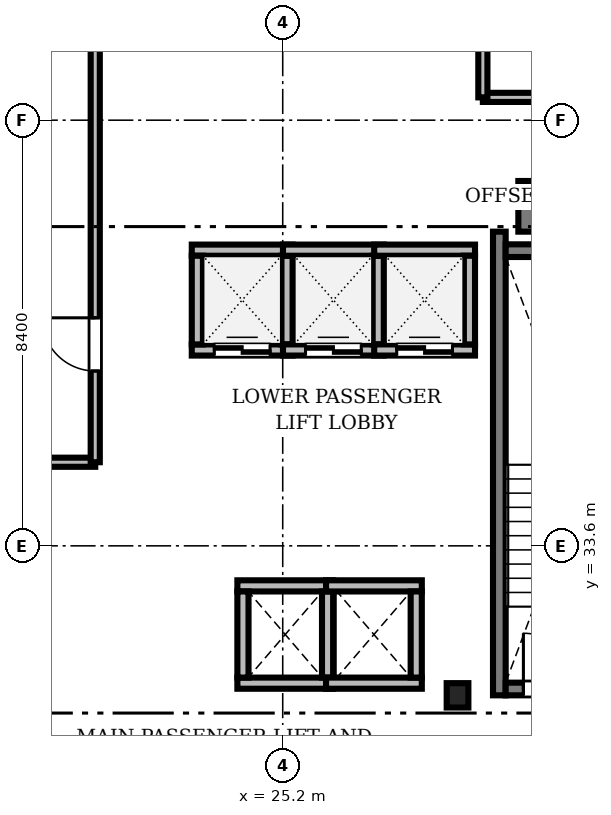
"""IFC4 building model, lengths in metres.
Left out: names, types, materials, properties, quantities, classifications, styles, units other than length and angle.
Written with IfcOpenShell. Run it as: python <this file> out.ifc"""

import sys

from ifc_helpers import new_model, si_unit, direction, frame, frame_2d, origin, origin_2d, place, context, subcontext, project, spatial, rectangle, i_section, extrude, source, transform, mapped, element, fill, save


model = new_model("IFC4")
c1 = context("Model", 3, precision=1e-05, world=origin(), true_north=direction((0.0, 1.0)))
c2 = subcontext(c1, "Body", "Model", "MODEL_VIEW")
j1 = project(units=[si_unit("LENGTHUNIT", "METRE"), si_unit("PLANEANGLEUNIT", "RADIAN")], contexts=[c1])
p1 = place(None, origin())
s1 = spatial("IfcSite", under=j1, at=p1, CompositionType="ELEMENT")
p2 = place(p1, origin())
s2 = spatial("IfcBuilding", under=s1, at=p2, CompositionType="ELEMENT")
p3 = place(p2, frame((0.0, 0.0, 56.8)))
s3 = spatial("IfcBuildingStorey", under=s2, at=p3, CompositionType="ELEMENT", Elevation=56.8)
m1 = source(origin(), c2, "Body", "SweptSolid", [
    extrude(rectangle(XDim=17.52, YDim=1.0, at=frame_2d((8.76, 0.0))), origin(), (0.0, 0.0, 1.0), 3.41),
])
p4 = place(p3, frame((29.85, 40.3, 0.0), z_axis=(0.0, 0.0, 1.0), x_axis=(1.0, 0.0, 0.0)))
e1 = element("IfcWall", 1, at=p4, inside=s3, PredefinedType="SHEAR", context=c2, shape_type="MappedRepresentation", body=[
    mapped(m1, transform((0.0, 0.0, 0.0), scale=1.0)),
])
m2 = source(origin(), c2, "Body", "SweptSolid", [
    extrude(i_section(OverallWidth=0.428, OverallDepth=0.481, WebThickness=0.04, FlangeThickness=0.063, FilletRadius=0.015, at=origin_2d()), origin(), (0.0, 0.0, 1.0), 3.41),
])
p5 = place(p3, frame((28.65, 30.65, 0.0), z_axis=(0.0, 0.0, 1.0), x_axis=(1.0, 0.0, 0.0)))
e2 = element("IfcColumn", 2, at=p5, inside=s3, PredefinedType="COLUMN", context=c2, shape_type="MappedRepresentation", body=[
    mapped(m2, transform((0.0, 0.0, 0.0), scale=1.0)),
])
m3 = source(origin(), c2, "Body", "SweptSolid", [
    extrude(rectangle(XDim=9.15, YDim=0.25, at=frame_2d((4.575, 0.0))), origin(), (0.0, 0.0, 1.0), 3.45),
])
p6 = place(p3, frame((29.475, 30.65, 0.0), z_axis=(0.0, 0.0, 1.0), x_axis=(0.0, 1.0, 0.0)))
e3 = element("IfcWall", 3, at=p6, inside=s3, PredefinedType="SOLIDWALL", context=c2, shape_type="MappedRepresentation", body=[
    mapped(m3, transform((0.0, 0.0, 0.0), scale=1.0)),
])
m4 = source(origin(), c2, "Body", "SweptSolid", [
    extrude(rectangle(XDim=3.15, YDim=0.25, at=frame_2d((1.575, 0.0))), origin(), (0.0, 0.0, 1.0), 3.45),
])
p7 = place(p3, frame((29.6, 39.425, 0.0), z_axis=(0.0, 0.0, 1.0), x_axis=(1.0, 0.0, 0.0)))
e4 = element("IfcWall", 4, at=p7, inside=s3, PredefinedType="SOLIDWALL", context=c2, shape_type="MappedRepresentation", body=[
    mapped(m4, transform((0.0, 0.0, 0.0), scale=1.0)),
])
p8 = place(p3, frame((29.6, 30.775, 0.0), z_axis=(0.0, 0.0, 1.0), x_axis=(1.0, 0.0, 0.0)))
e5 = element("IfcWall", 5, at=p8, inside=s3, PredefinedType="SOLIDWALL", context=c2, shape_type="MappedRepresentation", body=[
    mapped(m4, transform((0.0, 0.0, 0.0), scale=1.0)),
])
m5 = source(origin(), c2, "Body", "SweptSolid", [
    extrude(rectangle(XDim=1.1, YDim=2.2, at=frame_2d((0.55, 1.1))), frame((0.0, 0.135, 0.0), z_axis=(0.0, -1.0, 0.0), x_axis=(1.0, 0.0, 0.0)), (0.0, 0.0, 1.0), 0.27),
])
p9 = place(p8, frame((0.35, 0.0, 0.0)))
e6 = element("IfcOpeningElement", 6, at=p9, cuts=e5, PredefinedType="OPENING", context=c2, shape_type="MappedRepresentation", body=[
    mapped(m5, transform((0.0, 0.0, 0.0), scale=1.0)),
])
m6 = source(origin(), c2, "Body", "SweptSolid", [
    extrude(rectangle(XDim=1.99, YDim=0.22, at=frame_2d((0.995, 0.0))), origin(), (0.0, 0.0, 1.0), 3.41),
])
p10 = place(p3, frame((23.405, 37.465, 0.0), z_axis=(0.0, 0.0, 1.0), x_axis=(1.0, 0.0, 0.0)))
e7 = element("IfcWall", 7, at=p10, inside=s3, PredefinedType="SOLIDWALL", context=c2, shape_type="MappedRepresentation", body=[
    mapped(m6, transform((0.0, 0.0, 0.0), scale=1.0)),
])
m7 = source(origin(), c2, "Body", "SweptSolid", [
    extrude(rectangle(XDim=1.1, YDim=2.2, at=frame_2d((0.55, 1.1))), frame((0.0, 0.12, 0.0), z_axis=(0.0, -1.0, 0.0), x_axis=(1.0, 0.0, 0.0)), (0.0, 0.0, 1.0), 0.24),
])
p11 = place(p10, frame((0.445, 0.0, 0.0)))
e8 = element("IfcOpeningElement", 8, at=p11, cuts=e7, PredefinedType="OPENING", context=c2, shape_type="MappedRepresentation", body=[
    mapped(m7, transform((0.0, 0.0, 0.0), scale=1.0)),
])
p12 = place(p3, frame((23.405, 39.435, 0.0), z_axis=(0.0, 0.0, 1.0), x_axis=(1.0, 0.0, 0.0)))
e9 = element("IfcWall", 9, at=p12, inside=s3, PredefinedType="SOLIDWALL", context=c2, shape_type="MappedRepresentation", body=[
    mapped(m6, transform((0.0, 0.0, 0.0), scale=1.0)),
])
m8 = source(origin(), c2, "Body", "SweptSolid", [
    extrude(rectangle(XDim=1.75, YDim=0.22, at=frame_2d((0.875, 0.0))), origin(), (0.0, 0.0, 1.0), 3.41),
])
for number, where, z_axis, x_axis in (
    (10, (23.515, 37.575, 0.0), (0.0, 0.0, 1.0), (0.0, 1.0, 0.0)),
    (11, (25.285, 37.575, 0.0), (0.0, 0.0, 1.0), (0.0, 1.0, 0.0)),
):
    element("IfcWall", number, at=place(p3, frame(where, z_axis=z_axis, x_axis=x_axis)), inside=s3, PredefinedType="SOLIDWALL", context=c2, shape_type="MappedRepresentation", body=[
        mapped(m8, transform((0.0, 0.0, 0.0), scale=1.0)),
    ])
p13 = place(p3, frame((25.205, 37.465, 0.0), z_axis=(0.0, 0.0, 1.0), x_axis=(1.0, 0.0, 0.0)))
e12 = element("IfcWall", 12, at=p13, inside=s3, PredefinedType="SOLIDWALL", context=c2, shape_type="MappedRepresentation", body=[
    mapped(m6, transform((0.0, 0.0, 0.0), scale=1.0)),
])
p14 = place(p13, frame((0.445, 0.0, 0.0)))
e13 = element("IfcOpeningElement", 13, at=p14, cuts=e12, PredefinedType="OPENING", context=c2, shape_type="MappedRepresentation", body=[
    mapped(m7, transform((0.0, 0.0, 0.0), scale=1.0)),
])
p15 = place(p3, frame((25.205, 39.435, 0.0), z_axis=(0.0, 0.0, 1.0), x_axis=(1.0, 0.0, 0.0)))
e14 = element("IfcWall", 14, at=p15, inside=s3, PredefinedType="SOLIDWALL", context=c2, shape_type="MappedRepresentation", body=[
    mapped(m6, transform((0.0, 0.0, 0.0), scale=1.0)),
])
p16 = place(p3, frame((27.085, 37.575, 0.0), z_axis=(0.0, 0.0, 1.0), x_axis=(0.0, 1.0, 0.0)))
e15 = element("IfcWall", 15, at=p16, inside=s3, PredefinedType="SOLIDWALL", context=c2, shape_type="MappedRepresentation", body=[
    mapped(m8, transform((0.0, 0.0, 0.0), scale=1.0)),
])
m9 = source(origin(), c2, "Body", "SweptSolid", [
    extrude(rectangle(XDim=1.99, YDim=0.22, at=frame_2d((0.995, 0.0))), origin(), (0.0, 0.0, 1.0), 3.41),
])
p17 = place(p3, frame((27.005, 37.465, 0.0), z_axis=(0.0, 0.0, 1.0), x_axis=(1.0, 0.0, 0.0)))
e16 = element("IfcWall", 16, at=p17, inside=s3, PredefinedType="SOLIDWALL", context=c2, shape_type="MappedRepresentation", body=[
    mapped(m9, transform((0.0, 0.0, 0.0), scale=1.0)),
])
p18 = place(p17, frame((0.445, 0.0, 0.0)))
e17 = element("IfcOpeningElement", 17, at=p18, cuts=e16, PredefinedType="OPENING", context=c2, shape_type="MappedRepresentation", body=[
    mapped(m7, transform((0.0, 0.0, 0.0), scale=1.0)),
])
p19 = place(p3, frame((27.005, 39.435, 0.0), z_axis=(0.0, 0.0, 1.0), x_axis=(1.0, 0.0, 0.0)))
e18 = element("IfcWall", 18, at=p19, inside=s3, PredefinedType="SOLIDWALL", context=c2, shape_type="MappedRepresentation", body=[
    mapped(m9, transform((0.0, 0.0, 0.0), scale=1.0)),
])
p20 = place(p3, frame((28.885, 37.575, 0.0), z_axis=(0.0, 0.0, 1.0), x_axis=(0.0, 1.0, 0.0)))
e19 = element("IfcWall", 19, at=p20, inside=s3, PredefinedType="SOLIDWALL", context=c2, shape_type="MappedRepresentation", body=[
    mapped(m8, transform((0.0, 0.0, 0.0), scale=1.0)),
])
m10 = source(origin(), c2, "Body", "SweptSolid", [
    extrude(rectangle(XDim=1.89, YDim=0.22, at=frame_2d((0.945, 0.0))), origin(), (0.0, 0.0, 1.0), 3.41),
])
for number, where, z_axis, x_axis in (
    (20, (24.305, 30.89, 0.0), (0.0, 0.0, 1.0), (1.0, 0.0, 0.0)),
    (21, (24.305, 32.81, 0.0), (0.0, 0.0, 1.0), (1.0, 0.0, 0.0)),
):
    element("IfcWall", number, at=place(p3, frame(where, z_axis=z_axis, x_axis=x_axis)), inside=s3, PredefinedType="SOLIDWALL", context=c2, shape_type="MappedRepresentation", body=[
        mapped(m10, transform((0.0, 0.0, 0.0), scale=1.0)),
    ])
m11 = source(origin(), c2, "Body", "SweptSolid", [
    extrude(rectangle(XDim=1.7, YDim=0.22, at=frame_2d((0.85, 0.0))), origin(), (0.0, 0.0, 1.0), 3.41),
])
for number, where, z_axis, x_axis in (
    (22, (24.415, 31.0, 0.0), (0.0, 0.0, 1.0), (0.0, 1.0, 0.0)),
    (23, (26.085, 31.0, 0.0), (0.0, 0.0, 1.0), (0.0, 1.0, 0.0)),
):
    element("IfcWall", number, at=place(p3, frame(where, z_axis=z_axis, x_axis=x_axis)), inside=s3, PredefinedType="SOLIDWALL", context=c2, shape_type="MappedRepresentation", body=[
        mapped(m11, transform((0.0, 0.0, 0.0), scale=1.0)),
    ])
for number, where, z_axis, x_axis in (
    (24, (26.055, 30.89, 0.0), (0.0, 0.0, 1.0), (1.0, 0.0, 0.0)),
    (25, (26.055, 32.81, 0.0), (0.0, 0.0, 1.0), (1.0, 0.0, 0.0)),
):
    element("IfcWall", number, at=place(p3, frame(where, z_axis=z_axis, x_axis=x_axis)), inside=s3, PredefinedType="SOLIDWALL", context=c2, shape_type="MappedRepresentation", body=[
        mapped(m10, transform((0.0, 0.0, 0.0), scale=1.0)),
    ])
p21 = place(p3, frame((27.835, 31.0, 0.0), z_axis=(0.0, 0.0, 1.0), x_axis=(0.0, 1.0, 0.0)))
e26 = element("IfcWall", 26, at=p21, inside=s3, PredefinedType="SOLIDWALL", context=c2, shape_type="MappedRepresentation", body=[
    mapped(m11, transform((0.0, 0.0, 0.0), scale=1.0)),
])
m12 = source(origin(), c2, "Body", "SweptSolid", [
    extrude(rectangle(XDim=19.428, YDim=0.18, at=frame_2d((9.714, 0.0))), origin(), (0.0, 0.0, 1.0), 2.652),
])
p22 = place(p3, frame((29.15, 42.45, 0.0), z_axis=(0.0, 0.0, 1.0), x_axis=(1.0, 0.0, 0.0)))
e27 = element("IfcWall", 27, at=p22, inside=s3, PredefinedType="PARTITIONING", context=c2, shape_type="MappedRepresentation", body=[
    mapped(m12, transform((0.0, 0.0, 0.0), scale=1.0)),
])
m13 = source(origin(), c2, "Body", "SweptSolid", [
    extrude(rectangle(XDim=1.05, YDim=2.2, at=frame_2d((0.525, 1.1))), frame((0.0, 0.1, 0.0), z_axis=(0.0, -1.0, 0.0), x_axis=(1.0, 0.0, 0.0)), (0.0, 0.0, 1.0), 0.2),
])
p23 = place(p22, frame((4.5, 0.0, 0.0)))
e28 = element("IfcOpeningElement", 28, at=p23, cuts=e27, PredefinedType="OPENING", context=c2, shape_type="MappedRepresentation", body=[
    mapped(m13, transform((0.0, 0.0, 0.0), scale=1.0)),
])
m14 = source(origin(), c2, "Body", "SweptSolid", [
    extrude(rectangle(XDim=19.078, YDim=0.18, at=frame_2d((9.539, 0.0))), origin(), (0.0, 0.0, 1.0), 2.652),
])
p24 = place(p3, frame((2.422, 35.25, 0.0), z_axis=(0.0, 0.0, 1.0), x_axis=(1.0, 0.0, 0.0)))
e29 = element("IfcWall", 29, at=p24, inside=s3, PredefinedType="PARTITIONING", context=c2, shape_type="MappedRepresentation", body=[
    mapped(m14, transform((0.0, 0.0, 0.0), scale=1.0)),
])
p25 = place(p24, frame((14.843, 0.0, 0.0)))
e30 = element("IfcOpeningElement", 30, at=p25, cuts=e29, PredefinedType="OPENING", context=c2, shape_type="MappedRepresentation", body=[
    mapped(m13, transform((0.0, 0.0, 0.0), scale=1.0)),
])
m15 = source(origin(), c2, "Body", "SweptSolid", [
    extrude(rectangle(XDim=13.028, YDim=0.18, at=frame_2d((6.514, 0.0))), origin(), (0.0, 0.0, 1.0), 2.652),
])
p26 = place(p3, frame((21.5, 35.25, 0.0), z_axis=(0.0, 0.0, 1.0), x_axis=(0.0, 1.0, 0.0)))
e31 = element("IfcWall", 31, at=p26, inside=s3, PredefinedType="PARTITIONING", context=c2, shape_type="MappedRepresentation", body=[
    mapped(m15, transform((0.0, 0.0, 0.0), scale=1.0)),
])
p27 = place(p26, frame((1.8, 0.0, 0.0)))
e32 = element("IfcOpeningElement", 32, at=p27, cuts=e31, PredefinedType="OPENING", context=c2, shape_type="MappedRepresentation", body=[
    mapped(m13, transform((0.0, 0.0, 0.0), scale=1.0)),
])
m16 = source(origin(), c2, "Body", "SweptSolid", [
    extrude(rectangle(XDim=5.828, YDim=0.18, at=frame_2d((2.914, 0.0))), origin(), (0.0, 0.0, 1.0), 2.652),
])
p28 = place(p3, frame((29.15, 42.45, 0.0), z_axis=(0.0, 0.0, 1.0), x_axis=(0.0, 1.0, 0.0)))
e33 = element("IfcWall", 33, at=p28, inside=s3, PredefinedType="PARTITIONING", context=c2, shape_type="MappedRepresentation", body=[
    mapped(m16, transform((0.0, 0.0, 0.0), scale=1.0)),
])
m17 = source(origin(), c2, "Body", "SweptSolid", [
    extrude(rectangle(XDim=1.1, YDim=2.2, at=frame_2d((0.55, 1.1))), frame((0.0, 0.025, 0.0), z_axis=(0.0, -1.0, 0.0), x_axis=(1.0, 0.0, 0.0)), (0.0, 0.0, 1.0), 0.05),
])
p29 = place(p9, origin())
e34 = element("IfcDoor", 34, at=p29, inside=s3, OperationType="SINGLE_SWING_LEFT", PredefinedType="DOOR", context=c2, shape_type="MappedRepresentation", body=[
    mapped(m17, transform((0.0, 0.0, 0.0), scale=1.0)),
])
fill(e6, e34)
p30 = place(p11, origin())
e35 = element("IfcDoor", 35, at=p30, inside=s3, OperationType="DOUBLE_DOOR_SLIDING", PredefinedType="DOOR", context=c2, shape_type="MappedRepresentation", body=[
    mapped(m17, transform((0.0, 0.0, 0.0), scale=1.0)),
])
fill(e8, e35)
p31 = place(p14, origin())
e36 = element("IfcDoor", 36, at=p31, inside=s3, OperationType="DOUBLE_DOOR_SLIDING", PredefinedType="DOOR", context=c2, shape_type="MappedRepresentation", body=[
    mapped(m17, transform((0.0, 0.0, 0.0), scale=1.0)),
])
fill(e13, e36)
p32 = place(p18, origin())
e37 = element("IfcDoor", 37, at=p32, inside=s3, OperationType="DOUBLE_DOOR_SLIDING", PredefinedType="DOOR", context=c2, shape_type="MappedRepresentation", body=[
    mapped(m17, transform((0.0, 0.0, 0.0), scale=1.0)),
])
fill(e17, e37)
m18 = source(origin(), c2, "Body", "SweptSolid", [
    extrude(rectangle(XDim=1.05, YDim=2.2, at=frame_2d((0.525, 1.1))), frame((0.0, 0.025, 0.0), z_axis=(0.0, -1.0, 0.0), x_axis=(1.0, 0.0, 0.0)), (0.0, 0.0, 1.0), 0.05),
])
p33 = place(p27, origin())
e38 = element("IfcDoor", 38, at=p33, inside=s3, OperationType="SINGLE_SWING_RIGHT", PredefinedType="DOOR", context=c2, shape_type="MappedRepresentation", body=[
    mapped(m18, transform((0.0, 0.0, 0.0), scale=1.0)),
])
fill(e32, e38)
save(model, sys.argv[1])
